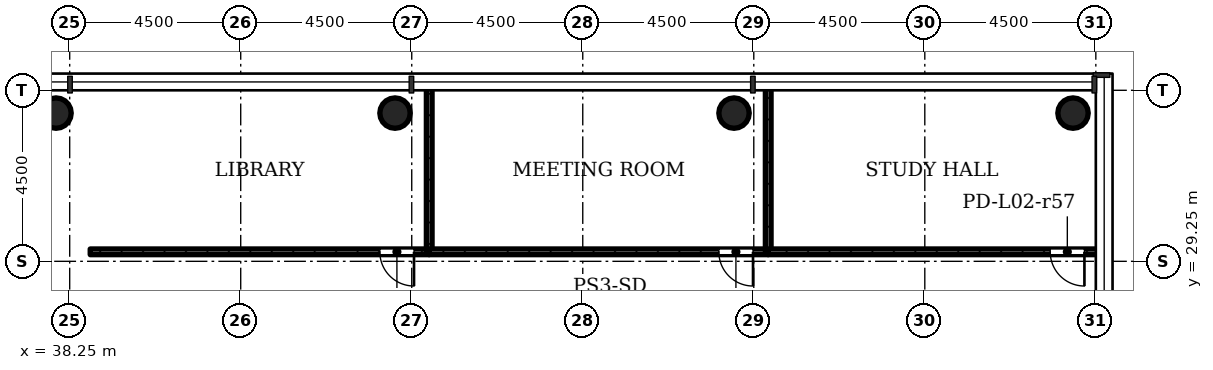
"""IFC4 building model, lengths in metres.
Left out: names, types, materials, properties, quantities, classifications, styles, units other than length and angle.
Written with IfcOpenShell. Run it as: python <this file> out.ifc"""

import sys

from ifc_helpers import new_model, si_unit, direction, frame, frame_2d, origin, origin_2d, place, context, subcontext, project, spatial, rectangle, hollow_circle, extrude, element, fill, save


model = new_model("IFC4")
c1 = context("Model", 3, precision=1e-05, world=origin(), true_north=direction((0.0, 1.0)))
c2 = subcontext(c1, "Body", "Model", "MODEL_VIEW")
j1 = project(units=[si_unit("LENGTHUNIT", "METRE"), si_unit("PLANEANGLEUNIT", "RADIAN")], contexts=[c1])
p1 = place(None, origin())
s1 = spatial("IfcSite", under=j1, at=p1, CompositionType="ELEMENT")
p2 = place(p1, origin())
s2 = spatial("IfcBuilding", under=s1, at=p2, CompositionType="ELEMENT")
p3 = place(p2, frame((0.0, 0.0, 11.0)))
s3 = spatial("IfcBuildingStorey", under=s2, at=p3, CompositionType="ELEMENT", Elevation=11.0)
for number, where, z_axis, x_axis in (
    (1, (37.89, 33.15, 0.0), (0.0, 0.0, 1.0), (1.0, 0.0, 0.0)),
    (2, (46.81, 33.15, 0.0), (0.0, 0.0, 1.0), (1.0, 0.0, 0.0)),
    (3, (55.73, 33.15, 0.0), (0.0, 0.0, 1.0), (1.0, 0.0, 0.0)),
    (4, (64.65, 33.15, 0.0), (0.0, 0.0, 1.0), (1.0, 0.0, 0.0)),
):
    element("IfcColumn", number, at=place(p3, frame(where, z_axis=z_axis, x_axis=x_axis)), inside=s3, PredefinedType="COLUMN", context=c2, shape_type="SweptSolid", body=[
        extrude(hollow_circle(Radius=0.4, WallThickness=0.028, at=origin_2d()), origin(), (0.0, 0.0, 1.0), 4.5),
    ])
p4 = place(p3, frame((47.71, 29.5, 0.0), z_axis=(0.0, 0.0, 1.0), x_axis=(-1.0, 0.0, 0.0)))
e5 = element("IfcWall", 5, at=p4, inside=s3, PredefinedType="PARTITIONING", context=c2, shape_type="SweptSolid", body=[
    extrude(rectangle(XDim=8.92, YDim=0.15, at=frame_2d((4.46, 0.0))), origin(), (0.0, 0.0, 1.0), 4.08),
])
p5 = place(p4, frame((0.4, 0.0, 0.0)))
e6 = element("IfcOpeningElement", 6, at=p5, cuts=e5, PredefinedType="OPENING", context=c2, shape_type="SweptSolid", body=[
    extrude(rectangle(XDim=0.9, YDim=2.1, at=frame_2d((0.45, 1.05))), frame((0.0, 0.085, 0.0), z_axis=(0.0, -1.0, 0.0), x_axis=(1.0, 0.0, 0.0)), (0.0, 0.0, 1.0), 0.17),
])
p6 = place(p3, frame((47.71, 33.85, 0.0), z_axis=(0.0, 0.0, 1.0), x_axis=(0.0, -1.0, 0.0)))
e7 = element("IfcWall", 7, at=p6, inside=s3, PredefinedType="PARTITIONING", context=c2, shape_type="SweptSolid", body=[
    extrude(rectangle(XDim=4.35, YDim=0.15, at=frame_2d((2.175, 0.0))), origin(), (0.0, 0.0, 1.0), 4.08),
])
p7 = place(p3, frame((56.63, 29.5, 0.0), z_axis=(0.0, 0.0, 1.0), x_axis=(-1.0, 0.0, 0.0)))
e8 = element("IfcWall", 8, at=p7, inside=s3, PredefinedType="PARTITIONING", context=c2, shape_type="SweptSolid", body=[
    extrude(rectangle(XDim=8.92, YDim=0.15, at=frame_2d((4.46, 0.0))), origin(), (0.0, 0.0, 1.0), 4.08),
])
p8 = place(p7, frame((0.4, 0.0, 0.0)))
e9 = element("IfcOpeningElement", 9, at=p8, cuts=e8, PredefinedType="OPENING", context=c2, shape_type="SweptSolid", body=[
    extrude(rectangle(XDim=0.9, YDim=2.1, at=frame_2d((0.45, 1.05))), frame((0.0, 0.085, 0.0), z_axis=(0.0, -1.0, 0.0), x_axis=(1.0, 0.0, 0.0)), (0.0, 0.0, 1.0), 0.17),
])
p9 = place(p3, frame((56.63, 33.85, 0.0), z_axis=(0.0, 0.0, 1.0), x_axis=(0.0, -1.0, 0.0)))
e10 = element("IfcWall", 10, at=p9, inside=s3, PredefinedType="PARTITIONING", context=c2, shape_type="SweptSolid", body=[
    extrude(rectangle(XDim=4.35, YDim=0.15, at=frame_2d((2.175, 0.0))), origin(), (0.0, 0.0, 1.0), 4.08),
])
p10 = place(p3, frame((65.35, 29.5, 0.0), z_axis=(0.0, 0.0, 1.0), x_axis=(-1.0, 0.0, 0.0)))
e11 = element("IfcWall", 11, at=p10, inside=s3, PredefinedType="PARTITIONING", context=c2, shape_type="SweptSolid", body=[
    extrude(rectangle(XDim=8.72, YDim=0.15, at=frame_2d((4.36, 0.0))), origin(), (0.0, 0.0, 1.0), 4.08),
])
p11 = place(p10, frame((0.4, 0.0, 0.0)))
e12 = element("IfcOpeningElement", 12, at=p11, cuts=e11, PredefinedType="OPENING", context=c2, shape_type="SweptSolid", body=[
    extrude(rectangle(XDim=0.9, YDim=2.1, at=frame_2d((0.45, 1.05))), frame((0.0, 0.085, 0.0), z_axis=(0.0, -1.0, 0.0), x_axis=(1.0, 0.0, 0.0)), (0.0, 0.0, 1.0), 0.17),
])
p12 = place(p5, origin())
e13 = element("IfcDoor", 13, at=p12, inside=s3, OperationType="SINGLE_SWING_RIGHT", PredefinedType="DOOR", context=c2, shape_type="SweptSolid", body=[
    extrude(rectangle(XDim=0.9, YDim=2.1, at=frame_2d((0.45, 1.05))), frame((0.0, 0.025, 0.0), z_axis=(0.0, -1.0, 0.0), x_axis=(1.0, 0.0, 0.0)), (0.0, 0.0, 1.0), 0.05),
])
fill(e6, e13)
p13 = place(p8, origin())
e14 = element("IfcDoor", 14, at=p13, inside=s3, OperationType="SINGLE_SWING_RIGHT", PredefinedType="DOOR", context=c2, shape_type="SweptSolid", body=[
    extrude(rectangle(XDim=0.9, YDim=2.1, at=frame_2d((0.45, 1.05))), frame((0.0, 0.025, 0.0), z_axis=(0.0, -1.0, 0.0), x_axis=(1.0, 0.0, 0.0)), (0.0, 0.0, 1.0), 0.05),
])
fill(e9, e14)
p14 = place(p11, origin())
e15 = element("IfcDoor", 15, at=p14, inside=s3, OperationType="SINGLE_SWING_RIGHT", PredefinedType="DOOR", context=c2, shape_type="SweptSolid", body=[
    extrude(rectangle(XDim=0.9, YDim=2.1, at=frame_2d((0.45, 1.05))), frame((0.0, 0.025, 0.0), z_axis=(0.0, -1.0, 0.0), x_axis=(1.0, 0.0, 0.0)), (0.0, 0.0, 1.0), 0.05),
])
fill(e12, e15)
save(model, sys.argv[1])
